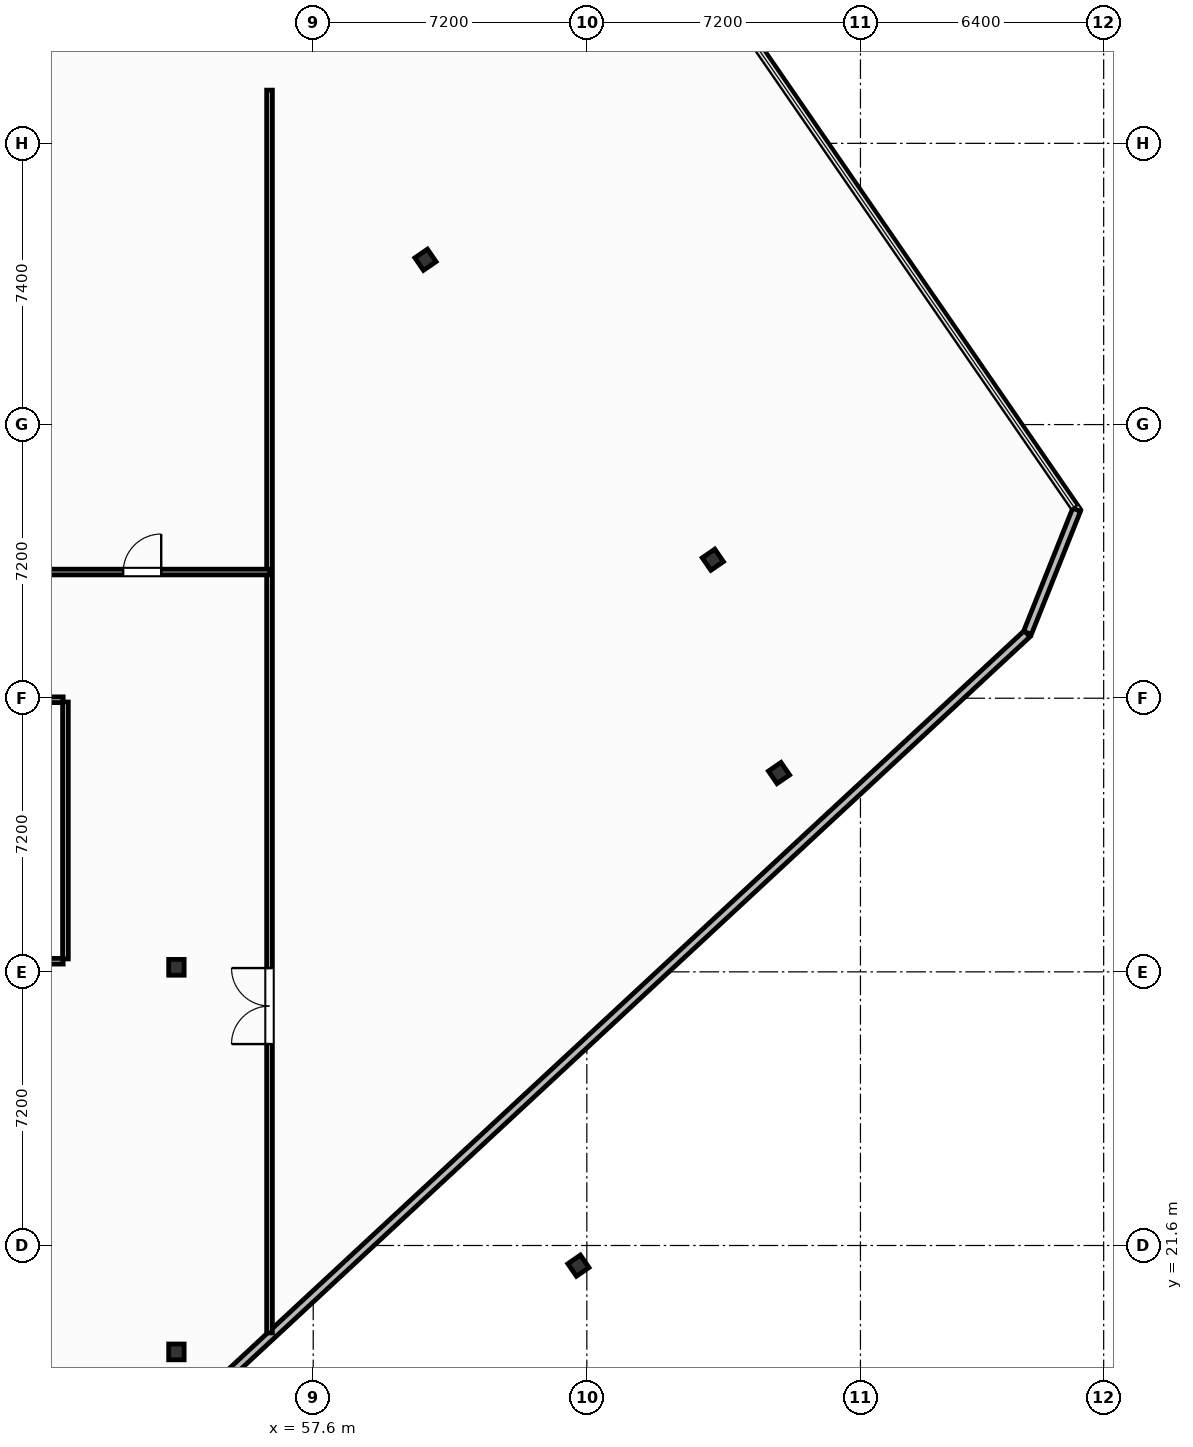
"""IFC4 building model, lengths in metres.
Left out: names, types, materials, properties, quantities, classifications, styles, units other than length and angle.
Written with IfcOpenShell. Run it as: python <this file> out.ifc"""

import sys

from ifc_helpers import new_model, si_unit, direction, frame, frame_2d, origin, origin_2d, place, context, subcontext, project, spatial, rectangle, i_section, extrude, element, fill, save


model = new_model("IFC4")
c1 = context("Model", 3, precision=1e-05, world=origin(), true_north=direction((0.0, 1.0)))
c2 = subcontext(c1, "Body", "Model", "MODEL_VIEW")
j1 = project(units=[si_unit("LENGTHUNIT", "METRE"), si_unit("PLANEANGLEUNIT", "RADIAN")], contexts=[c1])
p1 = place(None, origin())
s1 = spatial("IfcSite", under=j1, at=p1, CompositionType="ELEMENT")
p2 = place(p1, origin())
s2 = spatial("IfcBuilding", under=s1, at=p2, CompositionType="ELEMENT")
p3 = place(p2, frame((0.0, 0.0, 291.5)))
s3 = spatial("IfcBuildingStorey", under=s2, at=p3, CompositionType="ELEMENT", Elevation=291.5)
for number, where, z_axis, x_axis in (
    (1, (54.0, 18.8, 0.0), (0.0, 0.0, 1.0), (1.0, 0.0, 0.0)),
    (2, (54.0, 28.92, 0.0), (0.0, 0.0, 1.0), (1.0, 0.0, 0.0)),
):
    element("IfcColumn", number, at=place(p3, frame(where, z_axis=z_axis, x_axis=x_axis)), inside=s3, PredefinedType="COLUMN", context=c2, shape_type="SweptSolid", body=[
        extrude(i_section(OverallWidth=0.406, OverallDepth=0.416, WebThickness=0.03, FlangeThickness=0.048, FilletRadius=0.025, at=origin_2d()), origin(), (0.0, 0.0, 1.0), 4.8),
    ])
for number, where, z_axis, x_axis in (
    (3, (64.578, 21.07, 0.0), (0.0, 0.0, 1.0), (0.824, 0.567, 0.0)),
    (4, (69.857, 34.031, 0.0), (0.0, 0.0, 1.0), (0.824, 0.567, 0.0)),
    (5, (68.115, 39.644, 0.0), (0.0, 0.0, 1.0), (0.824, 0.567, 0.0)),
    (6, (60.554, 47.537, 0.0), (0.0, 0.0, 1.0), (0.824, 0.567, 0.0)),
):
    element("IfcColumn", number, at=place(p3, frame(where, z_axis=z_axis, x_axis=x_axis)), inside=s3, PredefinedType="COLUMN", context=c2, shape_type="SweptSolid", body=[
        extrude(i_section(OverallWidth=0.401, OverallDepth=0.399, WebThickness=0.025, FlangeThickness=0.04, FilletRadius=0.022, at=origin_2d()), origin(), (0.0, 0.0, 1.0), 4.8),
    ])
p4 = place(p3, frame((27.693, -7.489, 0.0), z_axis=(0.0, 0.0, 1.0), x_axis=(0.733009701217, 0.680218184057, 0.0)))
e7 = element("IfcWall", 7, at=p4, inside=s3, PredefinedType="SOLIDWALL", context=c2, shape_type="SweptSolid", body=[
    extrude(rectangle(XDim=66.428, YDim=0.22, at=frame_2d((33.214, 0.0))), origin(), (0.0, 0.0, 1.0), 2.265),
])
p5 = place(p4, frame((32.014, 0.0, 0.8)))
e8 = element("IfcOpeningElement", 8, at=p5, cuts=e7, PredefinedType="OPENING", context=c2, shape_type="SweptSolid", body=[
    extrude(rectangle(XDim=2.4, YDim=1.385, at=frame_2d((1.2, 0.692))), frame((0.0, 0.12, 0.0), z_axis=(0.0, -1.0, 0.0), x_axis=(1.0, 0.0, 0.0)), (0.0, 0.0, 1.0), 0.24),
])
p6 = place(p3, frame((76.395, 37.72, 0.0), z_axis=(0.0, 0.0, 1.0), x_axis=(0.370546091486, 0.928814079396, 0.0)))
e9 = element("IfcWall", 9, at=p6, inside=s3, PredefinedType="SOLIDWALL", context=c2, shape_type="SweptSolid", body=[
    extrude(rectangle(XDim=3.489, YDim=0.22, at=frame_2d((1.745, 0.0))), origin(), (0.0, 0.0, 1.0), 3.76),
])
p7 = place(p3, frame((50.695, 58.086, 0.0), z_axis=(0.0, 0.0, 1.0), x_axis=(-0.823531024939, -0.567271232272, 0.0)))
e10 = element("IfcWall", 10, at=p7, inside=s3, PredefinedType="SOLIDWALL", context=c2, shape_type="SweptSolid", body=[
    extrude(rectangle(XDim=56.157, YDim=0.22, at=frame_2d((28.079, 0.0))), origin(), (0.0, 0.0, 1.0), 3.76),
])
p8 = place(p7, frame((26.879, 0.0, 0.8)))
e11 = element("IfcOpeningElement", 11, at=p8, cuts=e10, PredefinedType="OPENING", context=c2, shape_type="SweptSolid", body=[
    extrude(rectangle(XDim=2.4, YDim=1.85, at=frame_2d((1.2, 0.925))), frame((0.0, 0.12, 0.0), z_axis=(0.0, -1.0, 0.0), x_axis=(1.0, 0.0, 0.0)), (0.0, 0.0, 1.0), 0.24),
])
p9 = place(p3, frame((56.45, 19.3, 0.0), z_axis=(0.0, 0.0, 1.0), x_axis=(0.0, 1.0, 0.0)))
e12 = element("IfcWall", 12, at=p9, inside=s3, PredefinedType="PARTITIONING", context=c2, shape_type="SweptSolid", body=[
    extrude(rectangle(XDim=32.7, YDim=0.15, at=frame_2d((16.35, 0.0))), origin(), (0.0, 0.0, 1.0), 2.265),
])
p10 = place(p9, frame((7.6, 0.0, 0.0)))
e13 = element("IfcOpeningElement", 13, at=p10, cuts=e12, PredefinedType="OPENING", context=c2, shape_type="SweptSolid", body=[
    extrude(rectangle(XDim=2.0, YDim=2.05, at=frame_2d((1.0, 1.025))), frame((0.0, 0.085, 0.0), z_axis=(0.0, -1.0, 0.0), x_axis=(1.0, 0.0, 0.0)), (0.0, 0.0, 1.0), 0.17),
])
p11 = place(p3, frame((28.0, 39.32, 0.0), z_axis=(0.0, 0.0, 1.0), x_axis=(1.0, 0.0, 0.0)))
e14 = element("IfcWall", 14, at=p11, inside=s3, PredefinedType="PARTITIONING", context=c2, shape_type="SweptSolid", body=[
    extrude(rectangle(XDim=28.45, YDim=0.15, at=frame_2d((14.225, 0.0))), origin(), (0.0, 0.0, 1.0), 4.48),
])
p12 = place(p11, frame((24.6, 0.0, 0.0)))
e15 = element("IfcOpeningElement", 15, at=p12, cuts=e14, PredefinedType="OPENING", context=c2, shape_type="SweptSolid", body=[
    extrude(rectangle(XDim=1.0, YDim=2.05, at=frame_2d((0.5, 1.025))), frame((0.0, 0.085, 0.0), z_axis=(0.0, -1.0, 0.0), x_axis=(1.0, 0.0, 0.0)), (0.0, 0.0, 1.0), 0.17),
])
p13 = place(p3, frame((48.3, 29.08, 0.0), z_axis=(0.0, 0.0, 1.0), x_axis=(1.0, 0.0, 0.0)))
e16 = element("IfcWall", 16, at=p13, inside=s3, PredefinedType="PARTITIONING", context=c2, shape_type="SweptSolid", body=[
    extrude(rectangle(XDim=2.72, YDim=0.15, at=frame_2d((1.36, 0.0))), origin(), (0.0, 0.0, 1.0), 3.692),
])
p14 = place(p13, frame((0.9, 0.0, 0.0)))
e17 = element("IfcOpeningElement", 17, at=p14, cuts=e16, PredefinedType="OPENING", context=c2, shape_type="SweptSolid", body=[
    extrude(rectangle(XDim=0.95, YDim=2.05, at=frame_2d((0.475, 1.025))), frame((0.0, 0.085, 0.0), z_axis=(0.0, -1.0, 0.0), x_axis=(1.0, 0.0, 0.0)), (0.0, 0.0, 1.0), 0.17),
])
p15 = place(p3, frame((48.3, 35.96, 0.0), z_axis=(0.0, 0.0, 1.0), x_axis=(1.0, 0.0, 0.0)))
e18 = element("IfcWall", 18, at=p15, inside=s3, PredefinedType="PARTITIONING", context=c2, shape_type="SweptSolid", body=[
    extrude(rectangle(XDim=2.72, YDim=0.15, at=frame_2d((1.36, 0.0))), origin(), (0.0, 0.0, 1.0), 4.48),
])
p16 = place(p3, frame((51.08, 29.14, 0.0), z_axis=(0.0, 0.0, 1.0), x_axis=(0.0, 1.0, 0.0)))
e19 = element("IfcWall", 19, at=p16, inside=s3, PredefinedType="PARTITIONING", context=c2, shape_type="SweptSolid", body=[
    extrude(rectangle(XDim=6.76, YDim=0.15, at=frame_2d((3.38, 0.0))), origin(), (0.0, 0.0, 1.0), 4.48),
])
p17 = place(p10, origin())
e20 = element("IfcDoor", 20, at=p17, inside=s3, OperationType="DOUBLE_DOOR_SINGLE_SWING", PredefinedType="DOOR", context=c2, shape_type="SweptSolid", body=[
    extrude(rectangle(XDim=2.0, YDim=2.05, at=frame_2d((1.0, 1.025))), frame((0.0, 0.025, 0.0), z_axis=(0.0, -1.0, 0.0), x_axis=(1.0, 0.0, 0.0)), (0.0, 0.0, 1.0), 0.05),
])
fill(e13, e20)
p18 = place(p12, origin())
e21 = element("IfcDoor", 21, at=p18, inside=s3, OperationType="SINGLE_SWING_RIGHT", PredefinedType="DOOR", context=c2, shape_type="SweptSolid", body=[
    extrude(rectangle(XDim=1.0, YDim=2.05, at=frame_2d((0.5, 1.025))), frame((0.0, 0.025, 0.0), z_axis=(0.0, -1.0, 0.0), x_axis=(1.0, 0.0, 0.0)), (0.0, 0.0, 1.0), 0.05),
])
fill(e15, e21)
save(model, sys.argv[1])
